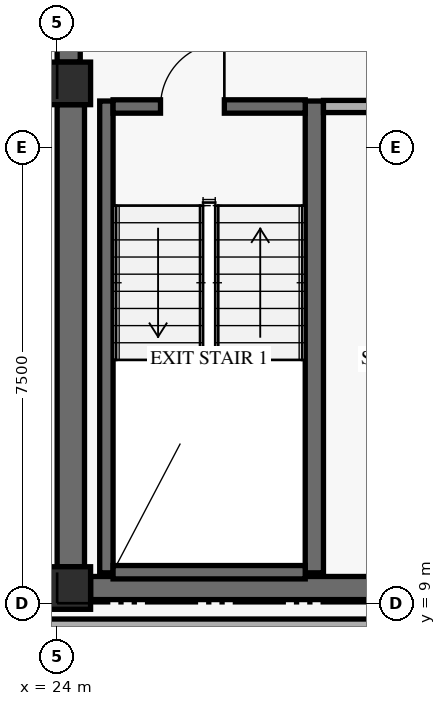
"""IFC4 building model, lengths in metres.
Left out: names, types, materials, properties, quantities, classifications, styles, units other than length and angle.
Written with IfcOpenShell. Run it as: python <this file> out.ifc"""

import sys

from ifc_helpers import new_model, si_unit, direction, frame, frame_2d, origin, origin_2d, place, context, subcontext, project, spatial, rectangle, extrude, element, fill, save


model = new_model("IFC4")
c1 = context("Model", 3, precision=1e-05, world=origin(), true_north=direction((0.0, 1.0)))
c2 = subcontext(c1, "Body", "Model", "MODEL_VIEW")
j1 = project(units=[si_unit("LENGTHUNIT", "METRE"), si_unit("PLANEANGLEUNIT", "RADIAN")], contexts=[c1])
p1 = place(None, origin())
s1 = spatial("IfcSite", under=j1, at=p1, CompositionType="ELEMENT")
p2 = place(p1, origin())
s2 = spatial("IfcBuilding", under=s1, at=p2, CompositionType="ELEMENT")
p3 = place(p2, frame((0.0, 0.0, 169.8)))
s3 = spatial("IfcBuildingStorey", under=s2, at=p3, CompositionType="ELEMENT", Elevation=169.8)
p4 = place(p3, frame((24.225, 9.6, 0.0), z_axis=(0.0, 0.0, 1.0), x_axis=(0.0, 1.0, 0.0)))
e1 = element("IfcWall", 1, at=p4, inside=s3, PredefinedType="SHEAR", context=c2, shape_type="SweptSolid", body=[
    extrude(rectangle(XDim=7.6, YDim=0.45, at=frame_2d((3.8, 0.0))), origin(), (0.0, 0.0, 1.0), 2.738),
])
p5 = place(p3, frame((24.19, 17.9, 0.0), z_axis=(0.0, 0.0, 1.0), x_axis=(0.0, 1.0, 0.0)))
e2 = element("IfcWall", 2, at=p5, inside=s3, PredefinedType="SHEAR", context=c2, shape_type="SweptSolid", body=[
    extrude(rectangle(XDim=11.95, YDim=0.38, at=frame_2d((5.975, 0.0))), origin(), (0.0, 0.0, 1.0), 2.738),
])
p6 = place(p3, frame((24.55, 9.25, 0.0), z_axis=(0.0, 0.0, 1.0), x_axis=(1.0, 0.0, 0.0)))
e3 = element("IfcWall", 3, at=p6, inside=s3, PredefinedType="SHEAR", context=c2, shape_type="SweptSolid", body=[
    extrude(rectangle(XDim=10.3, YDim=0.38, at=frame_2d((5.15, 0.0))), origin(), (0.0, 0.0, 1.0), 3.35),
])
p7 = place(p6, frame((5.2, 0.0, 0.0)))
e4 = element("IfcOpeningElement", 4, at=p7, cuts=e3, PredefinedType="OPENING", context=c2, shape_type="SweptSolid", body=[
    extrude(rectangle(XDim=1.05, YDim=2.15, at=frame_2d((0.525, 1.075))), frame((0.0, 0.2, 0.0), z_axis=(0.0, -1.0, 0.0), x_axis=(1.0, 0.0, 0.0)), (0.0, 0.0, 1.0), 0.4),
])
p8 = place(p3, frame((24.81, 9.5, 0.0), z_axis=(0.0, 0.0, 1.0), x_axis=(0.0, 1.0, 0.0)))
e5 = element("IfcWall", 5, at=p8, inside=s3, PredefinedType="SHEAR", context=c2, shape_type="SweptSolid", body=[
    extrude(rectangle(XDim=7.76, YDim=0.22, at=frame_2d((3.88, 0.0))), origin(), (0.0, 0.0, 1.0), 3.35),
])
p9 = place(p3, frame((28.23, 9.5, 0.0), z_axis=(0.0, 0.0, 1.0), x_axis=(0.0, 1.0, 0.0)))
e6 = element("IfcWall", 6, at=p9, inside=s3, PredefinedType="SHEAR", context=c2, shape_type="SweptSolid", body=[
    extrude(rectangle(XDim=7.76, YDim=0.3, at=frame_2d((3.88, 0.0))), origin(), (0.0, 0.0, 1.0), 3.35),
])
p10 = place(p3, frame((24.92, 9.51, 0.0), z_axis=(0.0, 0.0, 1.0), x_axis=(1.0, 0.0, 0.0)))
e7 = element("IfcWall", 7, at=p10, inside=s3, PredefinedType="SHEAR", context=c2, shape_type="SweptSolid", body=[
    extrude(rectangle(XDim=3.16, YDim=0.22, at=frame_2d((1.58, 0.0))), origin(), (0.0, 0.0, 1.0), 3.35),
])
p11 = place(p3, frame((24.92, 17.17, 0.0), z_axis=(0.0, 0.0, 1.0), x_axis=(1.0, 0.0, 0.0)))
e8 = element("IfcWall", 8, at=p11, inside=s3, PredefinedType="SHEAR", context=c2, shape_type="SweptSolid", body=[
    extrude(rectangle(XDim=3.16, YDim=0.22, at=frame_2d((1.58, 0.0))), origin(), (0.0, 0.0, 1.0), 3.35),
])
p12 = place(p11, frame((0.78, 0.0, 0.0)))
e9 = element("IfcOpeningElement", 9, at=p12, cuts=e8, PredefinedType="OPENING", context=c2, shape_type="SweptSolid", body=[
    extrude(rectangle(XDim=1.05, YDim=2.15, at=frame_2d((0.525, 1.075))), frame((0.0, 0.12, 0.0), z_axis=(0.0, -1.0, 0.0), x_axis=(1.0, 0.0, 0.0)), (0.0, 0.0, 1.0), 0.24),
])
for number, where, z_axis, x_axis in (
    (10, (24.2, 9.25, 0.0), (0.0, 0.0, 1.0), (1.0, 0.0, 0.0)),
    (11, (24.2, 17.55, 0.0), (0.0, 0.0, 1.0), (1.0, 0.0, 0.0)),
):
    element("IfcColumn", number, at=place(p3, frame(where, z_axis=z_axis, x_axis=x_axis)), inside=s3, PredefinedType="COLUMN", context=c2, shape_type="SweptSolid", body=[
        extrude(rectangle(XDim=0.7, YDim=0.7, at=origin_2d()), origin(), (0.0, 0.0, 1.0), 3.6),
    ])
p13 = place(p3, frame((28.38, 17.17, 0.0), z_axis=(0.0, 0.0, 1.0), x_axis=(1.0, 0.0, 0.0)))
e12 = element("IfcWall", 12, at=p13, inside=s3, PredefinedType="STANDARD", context=c2, shape_type="SweptSolid", body=[
    extrude(rectangle(XDim=2.9, YDim=0.2, at=frame_2d((1.45, 0.0))), origin(), (0.0, 0.0, 1.0), 3.35),
])
p14 = place(p3, frame((23.85, 8.65, 0.0), z_axis=(0.0, 0.0, 1.0), x_axis=(1.0, 0.0, 0.0)))
e13 = element("IfcWall", 13, at=p14, inside=s3, PredefinedType="STANDARD", context=c2, shape_type="SweptSolid", body=[
    extrude(rectangle(XDim=11.57, YDim=0.18, at=frame_2d((5.785, 0.0))), origin(), (0.0, 0.0, 1.0), 2.72),
])
p15 = place(p12, frame((1.05, 0.0, 0.0), z_axis=(0.0, 0.0, 1.0), x_axis=(-1.0, 0.0, 0.0)))
e14 = element("IfcDoor", 14, at=p15, inside=s3, OperationType="SINGLE_SWING_LEFT", PredefinedType="DOOR", context=c2, shape_type="SweptSolid", body=[
    extrude(rectangle(XDim=1.05, YDim=2.15, at=frame_2d((0.525, 1.075))), frame((0.0, 0.025, 0.0), z_axis=(0.0, -1.0, 0.0), x_axis=(1.0, 0.0, 0.0)), (0.0, 0.0, 1.0), 0.05),
])
fill(e9, e14)
save(model, sys.argv[1])
